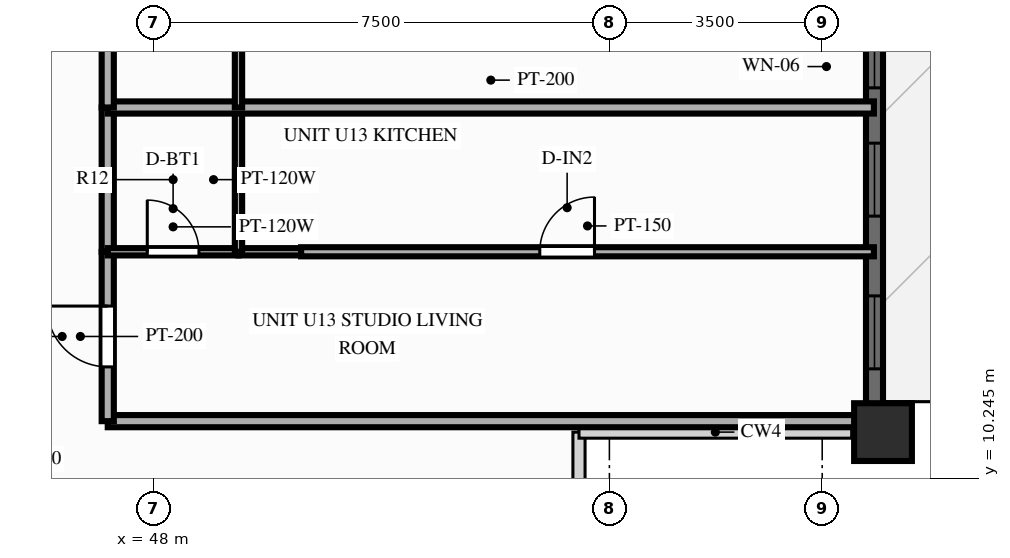
"""IFC4 building model, lengths in metres.
Left out: names, types, materials, properties, quantities, classifications, styles, units other than length and angle.
Written with IfcOpenShell. Run it as: python <this file> out.ifc"""

import sys

from ifc_helpers import new_model, si_unit, direction, frame, frame_2d, origin, origin_2d, place, context, subcontext, project, spatial, rectangle, extrude, source, transform, mapped, element, fill, save


model = new_model("IFC4")
c1 = context("Model", 3, precision=1e-05, world=origin(), true_north=direction((0.0, 1.0)))
c2 = subcontext(c1, "Body", "Model", "MODEL_VIEW")
j1 = project(units=[si_unit("LENGTHUNIT", "METRE"), si_unit("PLANEANGLEUNIT", "RADIAN")], contexts=[c1])
p1 = place(None, origin())
s1 = spatial("IfcSite", under=j1, at=p1, CompositionType="ELEMENT")
p2 = place(p1, origin())
s2 = spatial("IfcBuilding", under=s1, at=p2, CompositionType="ELEMENT")
p3 = place(p2, frame((0.0, 0.0, 166.0)))
s3 = spatial("IfcBuildingStorey", under=s2, at=p3, CompositionType="ELEMENT", Elevation=166.0)
m1 = source(origin(), c2, "Body", "SweptSolid", [
    extrude(rectangle(XDim=0.95, YDim=0.95, at=origin_2d()), origin(), (0.0, 0.0, 1.0), 3.0),
])
p4 = place(p3, frame((60.0, 11.0, 0.0), z_axis=(0.0, 0.0, 1.0), x_axis=(1.0, 0.0, 0.0)))
e1 = element("IfcColumn", 1, at=p4, inside=s3, PredefinedType="COLUMN", context=c2, shape_type="MappedRepresentation", body=[
    mapped(m1, transform((0.0, 0.0, 0.0), scale=1.0)),
])
p5 = place(p3, frame((59.86, 11.0, 0.0), z_axis=(0.0, 0.0, 1.0), x_axis=(0.0, 1.0, 0.0)))
e2 = element("IfcWall", 2, at=p5, inside=s3, PredefinedType="SOLIDWALL", context=c2, shape_type="SweptSolid", body=[
    extrude(rectangle(XDim=32.0, YDim=0.28, at=frame_2d((16.0, 0.0))), origin(), (0.0, 0.0, 1.0), 2.28),
])
p6 = place(p5, frame((1.04, 0.0, 0.25)))
e3 = element("IfcOpeningElement", 3, at=p6, cuts=e2, PredefinedType="OPENING", context=c2, shape_type="SweptSolid", body=[
    extrude(rectangle(XDim=1.2, YDim=1.5, at=frame_2d((0.6, 0.75))), frame((0.0, 0.152, 0.0), z_axis=(0.0, -1.0, 0.0), x_axis=(1.0, 0.0, 0.0)), (0.0, 0.0, 1.0), 0.304),
])
p7 = place(p5, frame((3.552, 0.0, 0.25)))
e4 = element("IfcOpeningElement", 4, at=p7, cuts=e2, PredefinedType="OPENING", context=c2, shape_type="SweptSolid", body=[
    extrude(rectangle(XDim=1.2, YDim=1.5, at=frame_2d((0.6, 0.75))), frame((0.0, 0.152, 0.0), z_axis=(0.0, -1.0, 0.0), x_axis=(1.0, 0.0, 0.0)), (0.0, 0.0, 1.0), 0.304),
])
p8 = place(p5, frame((5.662, 0.0, 0.25)))
e5 = element("IfcOpeningElement", 5, at=p8, cuts=e2, PredefinedType="OPENING", context=c2, shape_type="SweptSolid", body=[
    extrude(rectangle(XDim=0.7, YDim=1.5, at=frame_2d((0.35, 0.75))), frame((0.0, 0.152, 0.0), z_axis=(0.0, -1.0, 0.0), x_axis=(1.0, 0.0, 0.0)), (0.0, 0.0, 1.0), 0.304),
])
p9 = place(p5, frame((8.29, 0.0, 0.25)))
e6 = element("IfcOpeningElement", 6, at=p9, cuts=e2, PredefinedType="OPENING", context=c2, shape_type="SweptSolid", body=[
    extrude(rectangle(XDim=1.2, YDim=1.5, at=frame_2d((0.6, 0.75))), frame((0.0, 0.152, 0.0), z_axis=(0.0, -1.0, 0.0), x_axis=(1.0, 0.0, 0.0)), (0.0, 0.0, 1.0), 0.304),
])
p10 = place(p5, frame((10.688, 0.0, 0.25)))
e7 = element("IfcOpeningElement", 7, at=p10, cuts=e2, PredefinedType="OPENING", context=c2, shape_type="SweptSolid", body=[
    extrude(rectangle(XDim=1.2, YDim=1.5, at=frame_2d((0.6, 0.75))), frame((0.0, 0.152, 0.0), z_axis=(0.0, -1.0, 0.0), x_axis=(1.0, 0.0, 0.0)), (0.0, 0.0, 1.0), 0.304),
])
p11 = place(p5, frame((13.046, 0.0, 0.25)))
e8 = element("IfcOpeningElement", 8, at=p11, cuts=e2, PredefinedType="OPENING", context=c2, shape_type="SweptSolid", body=[
    extrude(rectangle(XDim=1.2, YDim=1.5, at=frame_2d((0.6, 0.75))), frame((0.0, 0.152, 0.0), z_axis=(0.0, -1.0, 0.0), x_axis=(1.0, 0.0, 0.0)), (0.0, 0.0, 1.0), 0.304),
])
p12 = place(p5, frame((15.4, 0.0, 0.25)))
e9 = element("IfcOpeningElement", 9, at=p12, cuts=e2, PredefinedType="OPENING", context=c2, shape_type="SweptSolid", body=[
    extrude(rectangle(XDim=1.2, YDim=1.5, at=frame_2d((0.6, 0.75))), frame((0.0, 0.152, 0.0), z_axis=(0.0, -1.0, 0.0), x_axis=(1.0, 0.0, 0.0)), (0.0, 0.0, 1.0), 0.304),
])
p13 = place(p5, frame((19.233, 0.0, 0.0), z_axis=(0.0, 0.0, 1.0), x_axis=(-1.0, 0.0, 0.0)))
e10 = element("IfcOpeningElement", 10, at=p13, cuts=e2, PredefinedType="OPENING", context=c2, shape_type="SweptSolid", body=[
    extrude(rectangle(XDim=1.6, YDim=2.15, at=frame_2d((0.8, 1.075))), frame((0.0, 0.152, 0.0), z_axis=(0.0, -1.0, 0.0), x_axis=(1.0, 0.0, 0.0)), (0.0, 0.0, 1.0), 0.304),
])
p14 = place(p5, frame((20.339, 0.0, 0.25)))
e11 = element("IfcOpeningElement", 11, at=p14, cuts=e2, PredefinedType="OPENING", context=c2, shape_type="SweptSolid", body=[
    extrude(rectangle(XDim=1.2, YDim=1.5, at=frame_2d((0.6, 0.75))), frame((0.0, 0.152, 0.0), z_axis=(0.0, -1.0, 0.0), x_axis=(1.0, 0.0, 0.0)), (0.0, 0.0, 1.0), 0.304),
])
p15 = place(p5, frame((22.788, 0.0, 0.25)))
e12 = element("IfcOpeningElement", 12, at=p15, cuts=e2, PredefinedType="OPENING", context=c2, shape_type="SweptSolid", body=[
    extrude(rectangle(XDim=1.2, YDim=1.5, at=frame_2d((0.6, 0.75))), frame((0.0, 0.152, 0.0), z_axis=(0.0, -1.0, 0.0), x_axis=(1.0, 0.0, 0.0)), (0.0, 0.0, 1.0), 0.304),
])
p16 = place(p5, frame((25.66, 0.0, 0.25)))
e13 = element("IfcOpeningElement", 13, at=p16, cuts=e2, PredefinedType="OPENING", context=c2, shape_type="SweptSolid", body=[
    extrude(rectangle(XDim=0.95, YDim=1.5, at=frame_2d((0.475, 0.75))), frame((0.0, 0.152, 0.0), z_axis=(0.0, -1.0, 0.0), x_axis=(1.0, 0.0, 0.0)), (0.0, 0.0, 1.0), 0.304),
])
p17 = place(p5, frame((27.475, 0.0, 0.25)))
e14 = element("IfcOpeningElement", 14, at=p17, cuts=e2, PredefinedType="OPENING", context=c2, shape_type="SweptSolid", body=[
    extrude(rectangle(XDim=1.2, YDim=1.5, at=frame_2d((0.6, 0.75))), frame((0.0, 0.152, 0.0), z_axis=(0.0, -1.0, 0.0), x_axis=(1.0, 0.0, 0.0)), (0.0, 0.0, 1.0), 0.304),
])
p18 = place(p5, frame((29.839, 0.0, 0.25)))
e15 = element("IfcOpeningElement", 15, at=p18, cuts=e2, PredefinedType="OPENING", context=c2, shape_type="SweptSolid", body=[
    extrude(rectangle(XDim=1.2, YDim=1.5, at=frame_2d((0.6, 0.75))), frame((0.0, 0.152, 0.0), z_axis=(0.0, -1.0, 0.0), x_axis=(1.0, 0.0, 0.0)), (0.0, 0.0, 1.0), 0.304),
])
p19 = place(p3, frame((47.25, 11.18, 0.0), z_axis=(0.0, 0.0, 1.0), x_axis=(1.0, 0.0, 0.0)))
e16 = element("IfcWall", 16, at=p19, inside=s3, PredefinedType="PARTITIONING", context=c2, shape_type="SweptSolid", body=[
    extrude(rectangle(XDim=12.6, YDim=0.2, at=frame_2d((6.3, 0.0))), origin(), (0.0, 0.0, 1.0), 2.79),
])
p20 = place(p3, frame((47.25, 11.18, 0.0), z_axis=(0.0, 0.0, 1.0), x_axis=(0.0, 1.0, 0.0)))
e17 = element("IfcWall", 17, at=p20, inside=s3, PredefinedType="PARTITIONING", context=c2, shape_type="SweptSolid", body=[
    extrude(rectangle(XDim=2.786, YDim=0.2, at=frame_2d((1.393, 0.0))), origin(), (0.0, 0.0, 1.0), 2.79),
])
p21 = place(p20, frame((0.893, 0.0, 0.0)))
e18 = element("IfcOpeningElement", 18, at=p21, cuts=e17, PredefinedType="OPENING", context=c2, shape_type="SweptSolid", body=[
    extrude(rectangle(XDim=1.0, YDim=2.15, at=frame_2d((0.5, 1.075))), frame((0.0, 0.112, 0.0), z_axis=(0.0, -1.0, 0.0), x_axis=(1.0, 0.0, 0.0)), (0.0, 0.0, 1.0), 0.224),
])
p22 = place(p3, frame((47.25, 13.966, 0.0), z_axis=(0.0, 0.0, 1.0), x_axis=(0.0, 1.0, 0.0)))
e19 = element("IfcWall", 19, at=p22, inside=s3, PredefinedType="PARTITIONING", context=c2, shape_type="SweptSolid", body=[
    extrude(rectangle(XDim=2.373, YDim=0.2, at=frame_2d((1.187, 0.0))), origin(), (0.0, 0.0, 1.0), 2.79),
])
p23 = place(p3, frame((47.25, 13.966, 0.0), z_axis=(0.0, 0.0, 1.0), x_axis=(1.0, 0.0, 0.0)))
e20 = element("IfcWall", 20, at=p23, inside=s3, PredefinedType="PARTITIONING", context=c2, shape_type="SweptSolid", body=[
    extrude(rectangle(XDim=2.15, YDim=0.12, at=frame_2d((1.075, 0.0))), origin(), (0.0, 0.0, 1.0), 2.79),
])
p24 = place(p23, frame((0.65, 0.0, 0.0)))
e21 = element("IfcOpeningElement", 21, at=p24, cuts=e20, PredefinedType="OPENING", context=c2, shape_type="SweptSolid", body=[
    extrude(rectangle(XDim=0.85, YDim=2.05, at=frame_2d((0.425, 1.025))), frame((0.0, 0.072, 0.0), z_axis=(0.0, -1.0, 0.0), x_axis=(1.0, 0.0, 0.0)), (0.0, 0.0, 1.0), 0.144),
])
p25 = place(p3, frame((49.4, 13.966, 0.0), z_axis=(0.0, 0.0, 1.0), x_axis=(1.0, 0.0, 0.0)))
e22 = element("IfcWall", 22, at=p25, inside=s3, PredefinedType="PARTITIONING", context=c2, shape_type="SweptSolid", body=[
    extrude(rectangle(XDim=1.03, YDim=0.12, at=frame_2d((0.515, 0.0))), origin(), (0.0, 0.0, 1.0), 2.79),
])
p26 = place(p3, frame((49.4, 13.966, 0.0), z_axis=(0.0, 0.0, 1.0), x_axis=(0.0, 1.0, 0.0)))
e23 = element("IfcWall", 23, at=p26, inside=s3, PredefinedType="PARTITIONING", context=c2, shape_type="SweptSolid", body=[
    extrude(rectangle(XDim=2.373, YDim=0.12, at=frame_2d((1.187, 0.0))), origin(), (0.0, 0.0, 1.0), 2.79),
])
p27 = place(p3, frame((50.43, 13.966, 0.0), z_axis=(0.0, 0.0, 1.0), x_axis=(1.0, 0.0, 0.0)))
e24 = element("IfcWall", 24, at=p27, inside=s3, PredefinedType="PARTITIONING", context=c2, shape_type="SweptSolid", body=[
    extrude(rectangle(XDim=9.42, YDim=0.15, at=frame_2d((4.71, 0.0))), origin(), (0.0, 0.0, 1.0), 2.79),
])
p28 = place(p27, frame((3.925, 0.0, 0.0)))
e25 = element("IfcOpeningElement", 25, at=p28, cuts=e24, PredefinedType="OPENING", context=c2, shape_type="SweptSolid", body=[
    extrude(rectangle(XDim=0.9, YDim=2.1, at=frame_2d((0.45, 1.05))), frame((0.0, 0.087, 0.0), z_axis=(0.0, -1.0, 0.0), x_axis=(1.0, 0.0, 0.0)), (0.0, 0.0, 1.0), 0.174),
])
p29 = place(p3, frame((47.25, 16.339, 0.0), z_axis=(0.0, 0.0, 1.0), x_axis=(1.0, 0.0, 0.0)))
e26 = element("IfcWall", 26, at=p29, inside=s3, PredefinedType="PARTITIONING", context=c2, shape_type="SweptSolid", body=[
    extrude(rectangle(XDim=12.6, YDim=0.2, at=frame_2d((6.3, 0.0))), origin(), (0.0, 0.0, 1.0), 2.79),
])
p30 = place(p3, frame((47.25, 16.339, 0.0), z_axis=(0.0, 0.0, 1.0), x_axis=(0.0, 1.0, 0.0)))
e27 = element("IfcWall", 27, at=p30, inside=s3, PredefinedType="PARTITIONING", context=c2, shape_type="SweptSolid", body=[
    extrude(rectangle(XDim=2.237, YDim=0.2, at=frame_2d((1.119, 0.0))), origin(), (0.0, 0.0, 1.0), 2.79),
])
p31 = place(p3, frame((49.4, 16.339, 0.0), z_axis=(0.0, 0.0, 1.0), x_axis=(0.0, 1.0, 0.0)))
e28 = element("IfcWall", 28, at=p31, inside=s3, PredefinedType="PARTITIONING", context=c2, shape_type="SweptSolid", body=[
    extrude(rectangle(XDim=2.237, YDim=0.12, at=frame_2d((1.119, 0.0))), origin(), (0.0, 0.0, 1.0), 2.79),
])
m2 = source(origin(), c2, "Body", "SweptSolid", [
    extrude(rectangle(XDim=1.2, YDim=1.5, at=frame_2d((0.6, 0.75))), frame((0.0, 0.03, 0.0), z_axis=(0.0, -1.0, 0.0), x_axis=(1.0, 0.0, 0.0)), (0.0, 0.0, 1.0), 0.06),
])
p32 = place(p6, origin())
e29 = element("IfcWindow", 29, at=p32, inside=s3, PartitioningType="SINGLE_PANEL", PredefinedType="WINDOW", context=c2, shape_type="MappedRepresentation", body=[
    mapped(m2, transform((0.0, 0.0, 0.0), scale=1.0)),
])
fill(e3, e29)
p33 = place(p7, origin())
e30 = element("IfcWindow", 30, at=p33, inside=s3, PartitioningType="SINGLE_PANEL", PredefinedType="WINDOW", context=c2, shape_type="MappedRepresentation", body=[
    mapped(m2, transform((0.0, 0.0, 0.0), scale=1.0)),
])
fill(e4, e30)
m3 = source(origin(), c2, "Body", "SweptSolid", [
    extrude(rectangle(XDim=0.7, YDim=1.5, at=frame_2d((0.35, 0.75))), frame((0.0, 0.03, 0.0), z_axis=(0.0, -1.0, 0.0), x_axis=(1.0, 0.0, 0.0)), (0.0, 0.0, 1.0), 0.06),
])
p34 = place(p8, origin())
e31 = element("IfcWindow", 31, at=p34, inside=s3, PartitioningType="SINGLE_PANEL", PredefinedType="WINDOW", context=c2, shape_type="MappedRepresentation", body=[
    mapped(m3, transform((0.0, 0.0, 0.0), scale=1.0)),
])
fill(e5, e31)
m4 = source(origin(), c2, "Body", "SweptSolid", [
    extrude(rectangle(XDim=1.0, YDim=2.15, at=frame_2d((0.5, 1.075))), frame((0.0, 0.025, 0.0), z_axis=(0.0, -1.0, 0.0), x_axis=(1.0, 0.0, 0.0)), (0.0, 0.0, 1.0), 0.05),
])
p35 = place(p21, origin())
e32 = element("IfcDoor", 32, at=p35, inside=s3, OperationType="SINGLE_SWING_RIGHT", PredefinedType="DOOR", context=c2, shape_type="MappedRepresentation", body=[
    mapped(m4, transform((0.0, 0.0, 0.0), scale=1.0)),
])
fill(e18, e32)
m5 = source(origin(), c2, "Body", "SweptSolid", [
    extrude(rectangle(XDim=0.85, YDim=2.05, at=frame_2d((0.425, 1.025))), frame((0.0, 0.025, 0.0), z_axis=(0.0, -1.0, 0.0), x_axis=(1.0, 0.0, 0.0)), (0.0, 0.0, 1.0), 0.05),
])
p36 = place(p24, origin())
e33 = element("IfcDoor", 33, at=p36, inside=s3, OperationType="SINGLE_SWING_LEFT", PredefinedType="DOOR", context=c2, shape_type="MappedRepresentation", body=[
    mapped(m5, transform((0.0, 0.0, 0.0), scale=1.0)),
])
fill(e21, e33)
m6 = source(origin(), c2, "Body", "SweptSolid", [
    extrude(rectangle(XDim=0.9, YDim=2.1, at=frame_2d((0.45, 1.05))), frame((0.0, 0.025, 0.0), z_axis=(0.0, -1.0, 0.0), x_axis=(1.0, 0.0, 0.0)), (0.0, 0.0, 1.0), 0.05),
])
p37 = place(p28, origin())
e34 = element("IfcDoor", 34, at=p37, inside=s3, OperationType="SINGLE_SWING_RIGHT", PredefinedType="DOOR", context=c2, shape_type="MappedRepresentation", body=[
    mapped(m6, transform((0.0, 0.0, 0.0), scale=1.0)),
])
fill(e25, e34)
save(model, sys.argv[1])
